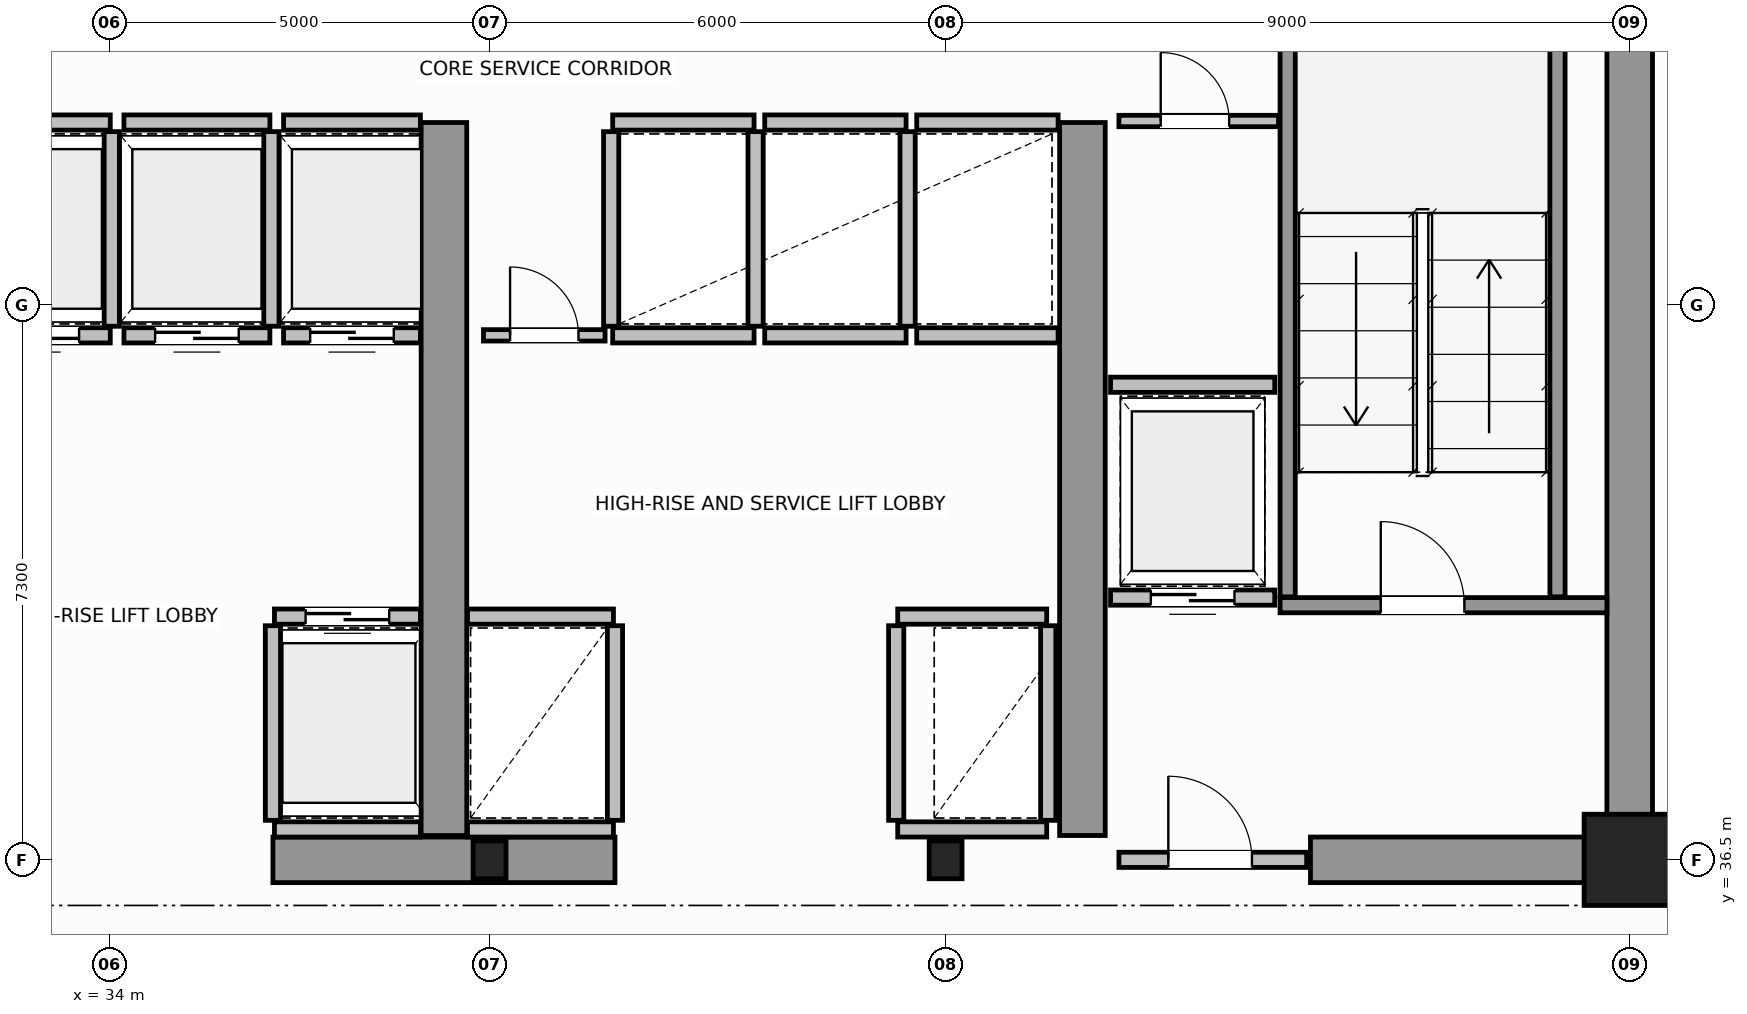
"""IFC4 building model, lengths in metres.
Left out: names, types, materials, properties, quantities, classifications, styles, units other than length and angle.
Written with IfcOpenShell. Run it as: python <this file> out.ifc"""

import sys

from ifc_helpers import new_model, si_unit, direction, frame, frame_2d, origin, origin_2d, place, context, subcontext, project, spatial, rectangle, i_section, extrude, source, transform, mapped, element, fill, save


model = new_model("IFC4")
c1 = context("Model", 3, precision=1e-05, world=origin(), true_north=direction((0.0, 1.0)))
c2 = subcontext(c1, "Body", "Model", "MODEL_VIEW")
j1 = project(units=[si_unit("LENGTHUNIT", "METRE"), si_unit("PLANEANGLEUNIT", "RADIAN")], contexts=[c1])
p1 = place(None, origin())
s1 = spatial("IfcSite", under=j1, at=p1, CompositionType="ELEMENT")
p2 = place(p1, origin())
s2 = spatial("IfcBuilding", under=s1, at=p2, CompositionType="ELEMENT")
p3 = place(p2, frame((0.0, 0.0, 191.8)))
s3 = spatial("IfcBuildingStorey", under=s2, at=p3, CompositionType="ELEMENT", Elevation=191.8)
m1 = source(origin(), c2, "Body", "SweptSolid", [
    extrude(i_section(OverallWidth=0.432, OverallDepth=0.498, WebThickness=0.055, FlangeThickness=0.068, FilletRadius=0.015, at=origin_2d()), origin(), (0.0, 0.0, 1.0), 3.8),
])
for number, where, z_axis, x_axis in (
    (1, (39.0, 36.5, 0.0), (0.0, 0.0, 1.0), (1.0, 0.0, 0.0)),
    (2, (45.0, 36.5, 0.0), (0.0, 0.0, 1.0), (1.0, 0.0, 0.0)),
):
    element("IfcColumn", number, at=place(p3, frame(where, z_axis=z_axis, x_axis=x_axis)), inside=s3, PredefinedType="COLUMN", context=c2, shape_type="MappedRepresentation", body=[
        mapped(m1, transform((0.0, 0.0, 0.0), scale=1.0)),
    ])
m2 = source(origin(), c2, "Body", "SweptSolid", [
    extrude(rectangle(XDim=1.2, YDim=1.2, at=origin_2d()), origin(), (0.0, 0.0, 1.0), 3.8),
])
p4 = place(p3, frame((54.0, 36.5, 0.0), z_axis=(0.0, 0.0, 1.0), x_axis=(1.0, 0.0, 0.0)))
e3 = element("IfcColumn", 3, at=p4, inside=s3, PredefinedType="COLUMN", context=c2, shape_type="MappedRepresentation", body=[
    mapped(m2, transform((0.0, 0.0, 0.0), scale=1.0)),
])
p5 = place(p3, frame((54.0, 36.5, 0.0), z_axis=(0.0, 0.0, 1.0), x_axis=(0.0, 1.0, 0.0)))
e4 = element("IfcWall", 4, at=p5, inside=s3, PredefinedType="SHEAR", context=c2, shape_type="SweptSolid", body=[
    extrude(rectangle(XDim=14.5, YDim=0.6, at=frame_2d((7.25, 0.0))), origin(), (0.0, 0.0, 1.0), 3.8),
])
p6 = place(p3, frame((36.15, 36.5, 0.0), z_axis=(0.0, 0.0, 1.0), x_axis=(1.0, 0.0, 0.0)))
e5 = element("IfcWall", 5, at=p6, inside=s3, PredefinedType="SHEAR", context=c2, shape_type="SweptSolid", body=[
    extrude(rectangle(XDim=4.5, YDim=0.6, at=frame_2d((2.25, 0.0))), origin(), (0.0, 0.0, 1.0), 3.8),
])
p7 = place(p3, frame((49.8, 36.5, 0.0), z_axis=(0.0, 0.0, 1.0), x_axis=(1.0, 0.0, 0.0)))
e6 = element("IfcWall", 6, at=p7, inside=s3, PredefinedType="SHEAR", context=c2, shape_type="SweptSolid", body=[
    extrude(rectangle(XDim=3.88, YDim=0.6, at=frame_2d((1.94, 0.0))), origin(), (0.0, 0.0, 1.0), 2.58),
])
for number, where, z_axis, x_axis in (
    (7, (38.4, 36.82, 0.0), (0.0, 0.0, 1.0), (0.0, 1.0, 0.0)),
    (8, (46.8, 36.82, 0.0), (0.0, 0.0, 1.0), (0.0, 1.0, 0.0)),
):
    element("IfcWall", number, at=place(p3, frame(where, z_axis=z_axis, x_axis=x_axis)), inside=s3, PredefinedType="SHEAR", context=c2, shape_type="SweptSolid", body=[
        extrude(rectangle(XDim=9.38, YDim=0.6, at=frame_2d((4.69, 0.0))), origin(), (0.0, 0.0, 1.0), 3.8),
    ])
p8 = place(p3, frame((49.4, 39.85, 0.0), z_axis=(0.0, 0.0, 1.0), x_axis=(1.0, 0.0, 0.0)))
e9 = element("IfcWall", 9, at=p8, inside=s3, PredefinedType="SOLIDWALL", context=c2, shape_type="SweptSolid", body=[
    extrude(rectangle(XDim=4.3, YDim=0.2, at=frame_2d((2.15, 0.0))), origin(), (0.0, 0.0, 1.0), 3.8),
])
p9 = place(p8, frame((1.325, 0.0, 0.0)))
e10 = element("IfcOpeningElement", 10, at=p9, cuts=e9, PredefinedType="OPENING", context=c2, shape_type="SweptSolid", body=[
    extrude(rectangle(XDim=1.1, YDim=2.15, at=frame_2d((0.55, 1.075))), frame((0.0, 0.11, 0.0), z_axis=(0.0, -1.0, 0.0), x_axis=(1.0, 0.0, 0.0)), (0.0, 0.0, 1.0), 0.22),
])
for number, where, z_axis, x_axis in (
    (11, (49.5, 39.96, 0.0), (0.0, 0.0, 1.0), (0.0, 1.0, 0.0)),
    (12, (53.05, 39.96, 0.0), (0.0, 0.0, 1.0), (0.0, 1.0, 0.0)),
):
    element("IfcWall", number, at=place(p3, frame(where, z_axis=z_axis, x_axis=x_axis)), inside=s3, PredefinedType="SOLIDWALL", context=c2, shape_type="SweptSolid", body=[
        extrude(rectangle(XDim=9.93, YDim=0.2, at=frame_2d((4.965, 0.0))), origin(), (0.0, 0.0, 1.0), 3.8),
    ])
p10 = place(p3, frame((47.28, 36.5, 0.0), z_axis=(0.0, 0.0, 1.0), x_axis=(1.0, 0.0, 0.0)))
e13 = element("IfcWall", 13, at=p10, inside=s3, PredefinedType="SOLIDWALL", context=c2, shape_type="SweptSolid", body=[
    extrude(rectangle(XDim=2.47, YDim=0.2, at=frame_2d((1.235, 0.0))), origin(), (0.0, 0.0, 1.0), 2.57),
])
p11 = place(p10, frame((0.65, 0.0, 0.0)))
e14 = element("IfcOpeningElement", 14, at=p11, cuts=e13, PredefinedType="OPENING", context=c2, shape_type="SweptSolid", body=[
    extrude(rectangle(XDim=1.1, YDim=2.15, at=frame_2d((0.55, 1.075))), frame((0.0, 0.11, 0.0), z_axis=(0.0, -1.0, 0.0), x_axis=(1.0, 0.0, 0.0)), (0.0, 0.0, 1.0), 0.22),
])
p12 = place(p3, frame((36.17, 39.7, 0.0), z_axis=(0.0, 0.0, 1.0), x_axis=(1.0, 0.0, 0.0)))
e15 = element("IfcWall", 15, at=p12, inside=s3, PredefinedType="SOLIDWALL", context=c2, shape_type="SweptSolid", body=[
    extrude(rectangle(XDim=1.92, YDim=0.2, at=frame_2d((0.96, 0.0))), origin(), (0.0, 0.0, 1.0), 3.58),
])
p13 = place(p12, frame((0.41, 0.0, 0.0)))
e16 = element("IfcOpeningElement", 16, at=p13, cuts=e15, PredefinedType="OPENING", context=c2, shape_type="SweptSolid", body=[
    extrude(rectangle(XDim=1.1, YDim=2.15, at=frame_2d((0.55, 1.075))), frame((0.0, 0.11, 0.0), z_axis=(0.0, -1.0, 0.0), x_axis=(1.0, 0.0, 0.0)), (0.0, 0.0, 1.0), 0.22),
])
p14 = place(p3, frame((36.17, 36.9, 0.0), z_axis=(0.0, 0.0, 1.0), x_axis=(1.0, 0.0, 0.0)))
e17 = element("IfcWall", 17, at=p14, inside=s3, PredefinedType="SOLIDWALL", context=c2, shape_type="SweptSolid", body=[
    extrude(rectangle(XDim=1.92, YDim=0.2, at=frame_2d((0.96, 0.0))), origin(), (0.0, 0.0, 1.0), 3.58),
])
p15 = place(p3, frame((36.15, 37.02, 0.0), z_axis=(0.0, 0.0, 1.0), x_axis=(0.0, 1.0, 0.0)))
e18 = element("IfcWall", 18, at=p15, inside=s3, PredefinedType="SOLIDWALL", context=c2, shape_type="SweptSolid", body=[
    extrude(rectangle(XDim=2.56, YDim=0.2, at=frame_2d((1.28, 0.0))), origin(), (0.0, 0.0, 1.0), 3.58),
])
p16 = place(p3, frame((32.09, 43.4, 0.0), z_axis=(0.0, 0.0, 1.0), x_axis=(1.0, 0.0, 0.0)))
e19 = element("IfcWall", 19, at=p16, inside=s3, PredefinedType="SOLIDWALL", context=c2, shape_type="SweptSolid", body=[
    extrude(rectangle(XDim=1.92, YDim=0.2, at=frame_2d((0.96, 0.0))), origin(), (0.0, 0.0, 1.0), 3.58),
])
p17 = place(p16, frame((0.41, 0.0, 0.0)))
e20 = element("IfcOpeningElement", 20, at=p17, cuts=e19, PredefinedType="OPENING", context=c2, shape_type="SweptSolid", body=[
    extrude(rectangle(XDim=1.1, YDim=2.15, at=frame_2d((0.55, 1.075))), frame((0.0, 0.11, 0.0), z_axis=(0.0, -1.0, 0.0), x_axis=(1.0, 0.0, 0.0)), (0.0, 0.0, 1.0), 0.22),
])
p18 = place(p3, frame((32.09, 46.2, 0.0), z_axis=(0.0, 0.0, 1.0), x_axis=(1.0, 0.0, 0.0)))
e21 = element("IfcWall", 21, at=p18, inside=s3, PredefinedType="SOLIDWALL", context=c2, shape_type="SweptSolid", body=[
    extrude(rectangle(XDim=1.92, YDim=0.2, at=frame_2d((0.96, 0.0))), origin(), (0.0, 0.0, 1.0), 3.58),
])
p19 = place(p3, frame((34.03, 43.52, 0.0), z_axis=(0.0, 0.0, 1.0), x_axis=(0.0, 1.0, 0.0)))
e22 = element("IfcWall", 22, at=p19, inside=s3, PredefinedType="SOLIDWALL", context=c2, shape_type="SweptSolid", body=[
    extrude(rectangle(XDim=2.56, YDim=0.2, at=frame_2d((1.28, 0.0))), origin(), (0.0, 0.0, 1.0), 3.58),
])
p20 = place(p3, frame((34.19, 43.4, 0.0), z_axis=(0.0, 0.0, 1.0), x_axis=(1.0, 0.0, 0.0)))
e23 = element("IfcWall", 23, at=p20, inside=s3, PredefinedType="SOLIDWALL", context=c2, shape_type="SweptSolid", body=[
    extrude(rectangle(XDim=1.92, YDim=0.2, at=frame_2d((0.96, 0.0))), origin(), (0.0, 0.0, 1.0), 3.58),
])
p21 = place(p20, frame((0.41, 0.0, 0.0)))
e24 = element("IfcOpeningElement", 24, at=p21, cuts=e23, PredefinedType="OPENING", context=c2, shape_type="SweptSolid", body=[
    extrude(rectangle(XDim=1.1, YDim=2.15, at=frame_2d((0.55, 1.075))), frame((0.0, 0.11, 0.0), z_axis=(0.0, -1.0, 0.0), x_axis=(1.0, 0.0, 0.0)), (0.0, 0.0, 1.0), 0.22),
])
p22 = place(p3, frame((34.19, 46.2, 0.0), z_axis=(0.0, 0.0, 1.0), x_axis=(1.0, 0.0, 0.0)))
e25 = element("IfcWall", 25, at=p22, inside=s3, PredefinedType="SOLIDWALL", context=c2, shape_type="SweptSolid", body=[
    extrude(rectangle(XDim=1.92, YDim=0.2, at=frame_2d((0.96, 0.0))), origin(), (0.0, 0.0, 1.0), 3.58),
])
p23 = place(p3, frame((36.13, 43.52, 0.0), z_axis=(0.0, 0.0, 1.0), x_axis=(0.0, 1.0, 0.0)))
e26 = element("IfcWall", 26, at=p23, inside=s3, PredefinedType="SOLIDWALL", context=c2, shape_type="SweptSolid", body=[
    extrude(rectangle(XDim=2.56, YDim=0.2, at=frame_2d((1.28, 0.0))), origin(), (0.0, 0.0, 1.0), 3.58),
])
p24 = place(p3, frame((36.29, 43.4, 0.0), z_axis=(0.0, 0.0, 1.0), x_axis=(1.0, 0.0, 0.0)))
e27 = element("IfcWall", 27, at=p24, inside=s3, PredefinedType="SOLIDWALL", context=c2, shape_type="SweptSolid", body=[
    extrude(rectangle(XDim=1.8, YDim=0.2, at=frame_2d((0.9, 0.0))), origin(), (0.0, 0.0, 1.0), 3.58),
])
p25 = place(p24, frame((0.35, 0.0, 0.0)))
e28 = element("IfcOpeningElement", 28, at=p25, cuts=e27, PredefinedType="OPENING", context=c2, shape_type="SweptSolid", body=[
    extrude(rectangle(XDim=1.1, YDim=2.15, at=frame_2d((0.55, 1.075))), frame((0.0, 0.11, 0.0), z_axis=(0.0, -1.0, 0.0), x_axis=(1.0, 0.0, 0.0)), (0.0, 0.0, 1.0), 0.22),
])
p26 = place(p3, frame((36.29, 46.2, 0.0), z_axis=(0.0, 0.0, 1.0), x_axis=(1.0, 0.0, 0.0)))
e29 = element("IfcWall", 29, at=p26, inside=s3, PredefinedType="SOLIDWALL", context=c2, shape_type="SweptSolid", body=[
    extrude(rectangle(XDim=1.8, YDim=0.2, at=frame_2d((0.9, 0.0))), origin(), (0.0, 0.0, 1.0), 3.58),
])
for number, where, z_axis, x_axis in (
    (30, (38.71, 39.7, 0.0), (0.0, 0.0, 1.0), (1.0, 0.0, 0.0)),
    (31, (38.71, 36.9, 0.0), (0.0, 0.0, 1.0), (1.0, 0.0, 0.0)),
):
    element("IfcWall", number, at=place(p3, frame(where, z_axis=z_axis, x_axis=x_axis)), inside=s3, PredefinedType="SOLIDWALL", context=c2, shape_type="SweptSolid", body=[
        extrude(rectangle(XDim=1.92, YDim=0.2, at=frame_2d((0.96, 0.0))), origin(), (0.0, 0.0, 1.0), 3.58),
    ])
p27 = place(p3, frame((40.65, 37.02, 0.0), z_axis=(0.0, 0.0, 1.0), x_axis=(0.0, 1.0, 0.0)))
e32 = element("IfcWall", 32, at=p27, inside=s3, PredefinedType="SOLIDWALL", context=c2, shape_type="SweptSolid", body=[
    extrude(rectangle(XDim=2.56, YDim=0.2, at=frame_2d((1.28, 0.0))), origin(), (0.0, 0.0, 1.0), 3.58),
])
p28 = place(p3, frame((44.37, 39.7, 0.0), z_axis=(0.0, 0.0, 1.0), x_axis=(1.0, 0.0, 0.0)))
e33 = element("IfcWall", 33, at=p28, inside=s3, PredefinedType="SOLIDWALL", context=c2, shape_type="SweptSolid", body=[
    extrude(rectangle(XDim=1.96, YDim=0.2, at=frame_2d((0.98, 0.0))), origin(), (0.0, 0.0, 1.0), 3.58),
])
p29 = place(p3, frame((44.37, 36.9, 0.0), z_axis=(0.0, 0.0, 1.0), x_axis=(1.0, 0.0, 0.0)))
e34 = element("IfcWall", 34, at=p29, inside=s3, PredefinedType="SOLIDWALL", context=c2, shape_type="SweptSolid", body=[
    extrude(rectangle(XDim=1.96, YDim=0.2, at=frame_2d((0.98, 0.0))), origin(), (0.0, 0.0, 1.0), 2.57),
])
for number, where, z_axis, x_axis in (
    (35, (44.35, 37.02, 0.0), (0.0, 0.0, 1.0), (0.0, 1.0, 0.0)),
    (36, (46.35, 37.02, 0.0), (0.0, 0.0, 1.0), (0.0, 1.0, 0.0)),
):
    element("IfcWall", number, at=place(p3, frame(where, z_axis=z_axis, x_axis=x_axis)), inside=s3, PredefinedType="SOLIDWALL", context=c2, shape_type="SweptSolid", body=[
        extrude(rectangle(XDim=2.56, YDim=0.2, at=frame_2d((1.28, 0.0))), origin(), (0.0, 0.0, 1.0), 3.58),
    ])
for number, where, z_axis, x_axis in (
    (37, (40.62, 43.4, 0.0), (0.0, 0.0, 1.0), (1.0, 0.0, 0.0)),
    (38, (40.62, 46.2, 0.0), (0.0, 0.0, 1.0), (1.0, 0.0, 0.0)),
):
    element("IfcWall", number, at=place(p3, frame(where, z_axis=z_axis, x_axis=x_axis)), inside=s3, PredefinedType="SOLIDWALL", context=c2, shape_type="SweptSolid", body=[
        extrude(rectangle(XDim=1.86, YDim=0.2, at=frame_2d((0.93, 0.0))), origin(), (0.0, 0.0, 1.0), 3.58),
    ])
for number, where, z_axis, x_axis in (
    (39, (40.6, 43.52, 0.0), (0.0, 0.0, 1.0), (0.0, 1.0, 0.0)),
    (40, (42.5, 43.52, 0.0), (0.0, 0.0, 1.0), (0.0, 1.0, 0.0)),
):
    element("IfcWall", number, at=place(p3, frame(where, z_axis=z_axis, x_axis=x_axis)), inside=s3, PredefinedType="SOLIDWALL", context=c2, shape_type="SweptSolid", body=[
        extrude(rectangle(XDim=2.56, YDim=0.2, at=frame_2d((1.28, 0.0))), origin(), (0.0, 0.0, 1.0), 3.58),
    ])
for number, where, z_axis, x_axis in (
    (41, (42.62, 43.4, 0.0), (0.0, 0.0, 1.0), (1.0, 0.0, 0.0)),
    (42, (42.62, 46.2, 0.0), (0.0, 0.0, 1.0), (1.0, 0.0, 0.0)),
):
    element("IfcWall", number, at=place(p3, frame(where, z_axis=z_axis, x_axis=x_axis)), inside=s3, PredefinedType="SOLIDWALL", context=c2, shape_type="SweptSolid", body=[
        extrude(rectangle(XDim=1.86, YDim=0.2, at=frame_2d((0.93, 0.0))), origin(), (0.0, 0.0, 1.0), 3.58),
    ])
p30 = place(p3, frame((44.5, 43.52, 0.0), z_axis=(0.0, 0.0, 1.0), x_axis=(0.0, 1.0, 0.0)))
e43 = element("IfcWall", 43, at=p30, inside=s3, PredefinedType="SOLIDWALL", context=c2, shape_type="SweptSolid", body=[
    extrude(rectangle(XDim=2.56, YDim=0.2, at=frame_2d((1.28, 0.0))), origin(), (0.0, 0.0, 1.0), 3.58),
])
for number, where, z_axis, x_axis in (
    (44, (44.62, 43.4, 0.0), (0.0, 0.0, 1.0), (1.0, 0.0, 0.0)),
    (45, (44.62, 46.2, 0.0), (0.0, 0.0, 1.0), (1.0, 0.0, 0.0)),
):
    element("IfcWall", number, at=place(p3, frame(where, z_axis=z_axis, x_axis=x_axis)), inside=s3, PredefinedType="SOLIDWALL", context=c2, shape_type="SweptSolid", body=[
        extrude(rectangle(XDim=1.86, YDim=0.2, at=frame_2d((0.93, 0.0))), origin(), (0.0, 0.0, 1.0), 3.58),
    ])
p31 = place(p3, frame((47.17, 39.95, 0.0), z_axis=(0.0, 0.0, 1.0), x_axis=(1.0, 0.0, 0.0)))
e46 = element("IfcWall", 46, at=p31, inside=s3, PredefinedType="SOLIDWALL", context=c2, shape_type="SweptSolid", body=[
    extrude(rectangle(XDim=2.16, YDim=0.2, at=frame_2d((1.08, 0.0))), origin(), (0.0, 0.0, 1.0), 3.58),
])
p32 = place(p31, frame((0.53, 0.0, 0.0)))
e47 = element("IfcOpeningElement", 47, at=p32, cuts=e46, PredefinedType="OPENING", context=c2, shape_type="SweptSolid", body=[
    extrude(rectangle(XDim=1.1, YDim=2.15, at=frame_2d((0.55, 1.075))), frame((0.0, 0.11, 0.0), z_axis=(0.0, -1.0, 0.0), x_axis=(1.0, 0.0, 0.0)), (0.0, 0.0, 1.0), 0.22),
])
p33 = place(p3, frame((47.17, 42.75, 0.0), z_axis=(0.0, 0.0, 1.0), x_axis=(1.0, 0.0, 0.0)))
e48 = element("IfcWall", 48, at=p33, inside=s3, PredefinedType="SOLIDWALL", context=c2, shape_type="SweptSolid", body=[
    extrude(rectangle(XDim=2.16, YDim=0.2, at=frame_2d((1.08, 0.0))), origin(), (0.0, 0.0, 1.0), 3.58),
])
p34 = place(p3, frame((47.28, 46.22, 0.0), z_axis=(0.0, 0.0, 1.0), x_axis=(1.0, 0.0, 0.0)))
e49 = element("IfcWall", 49, at=p34, inside=s3, PredefinedType="PARTITIONING", context=c2, shape_type="SweptSolid", body=[
    extrude(rectangle(XDim=2.1, YDim=0.15, at=frame_2d((1.05, 0.0))), origin(), (0.0, 0.0, 1.0), 3.58),
])
p35 = place(p34, frame((0.55, 0.0, 0.0)))
e50 = element("IfcOpeningElement", 50, at=p35, cuts=e49, PredefinedType="OPENING", context=c2, shape_type="SweptSolid", body=[
    extrude(rectangle(XDim=0.9, YDim=2.1, at=frame_2d((0.45, 1.05))), frame((0.0, 0.085, 0.0), z_axis=(0.0, -1.0, 0.0), x_axis=(1.0, 0.0, 0.0)), (0.0, 0.0, 1.0), 0.17),
])
p36 = place(p3, frame((38.92, 43.4, 0.0), z_axis=(0.0, 0.0, 1.0), x_axis=(1.0, 0.0, 0.0)))
e51 = element("IfcWall", 51, at=p36, inside=s3, PredefinedType="PARTITIONING", context=c2, shape_type="SweptSolid", body=[
    extrude(rectangle(XDim=1.6, YDim=0.15, at=frame_2d((0.8, 0.0))), origin(), (0.0, 0.0, 1.0), 3.58),
])
p37 = place(p36, frame((0.35, 0.0, 0.0)))
e52 = element("IfcOpeningElement", 52, at=p37, cuts=e51, PredefinedType="OPENING", context=c2, shape_type="SweptSolid", body=[
    extrude(rectangle(XDim=0.9, YDim=2.1, at=frame_2d((0.45, 1.05))), frame((0.0, 0.085, 0.0), z_axis=(0.0, -1.0, 0.0), x_axis=(1.0, 0.0, 0.0)), (0.0, 0.0, 1.0), 0.17),
])
p38 = place(p3, frame((54.06, 36.48, 0.0), z_axis=(0.0, 0.0, 1.0), x_axis=(1.0, 0.0, 0.0)))
e53 = element("IfcWall", 53, at=p38, inside=s3, PredefinedType="PARTITIONING", context=c2, shape_type="SweptSolid", body=[
    extrude(rectangle(XDim=6.651, YDim=0.12, at=frame_2d((3.325, 0.0))), origin(), (0.0, 0.0, 1.0), 2.97),
])
p39 = place(p38, frame((2.875, 0.0, 0.0)))
e54 = element("IfcOpeningElement", 54, at=p39, cuts=e53, PredefinedType="OPENING", context=c2, shape_type="SweptSolid", body=[
    extrude(rectangle(XDim=0.9, YDim=2.15, at=frame_2d((0.45, 1.075))), frame((0.0, 0.07, 0.0), z_axis=(0.0, -1.0, 0.0), x_axis=(1.0, 0.0, 0.0)), (0.0, 0.0, 1.0), 0.14),
])
m3 = source(origin(), c2, "Body", "SweptSolid", [
    extrude(rectangle(XDim=1.1, YDim=2.15, at=frame_2d((0.55, 1.075))), frame((0.0, 0.025, 0.0), z_axis=(0.0, -1.0, 0.0), x_axis=(1.0, 0.0, 0.0)), (0.0, 0.0, 1.0), 0.05),
])
p40 = place(p9, origin())
e55 = element("IfcDoor", 55, at=p40, inside=s3, OperationType="SINGLE_SWING_RIGHT", PredefinedType="DOOR", context=c2, shape_type="MappedRepresentation", body=[
    mapped(m3, transform((0.0, 0.0, 0.0), scale=1.0)),
])
fill(e10, e55)
p41 = place(p11, origin())
e56 = element("IfcDoor", 56, at=p41, inside=s3, OperationType="SINGLE_SWING_LEFT", PredefinedType="DOOR", context=c2, shape_type="MappedRepresentation", body=[
    mapped(m3, transform((0.0, 0.0, 0.0), scale=1.0)),
])
fill(e14, e56)
p42 = place(p13, origin())
e57 = element("IfcDoor", 57, at=p42, inside=s3, OperationType="DOUBLE_DOOR_SLIDING", PredefinedType="DOOR", context=c2, shape_type="MappedRepresentation", body=[
    mapped(m3, transform((0.0, 0.0, 0.0), scale=1.0)),
])
fill(e16, e57)
p43 = place(p17, origin())
e58 = element("IfcDoor", 58, at=p43, inside=s3, OperationType="DOUBLE_DOOR_SLIDING", PredefinedType="DOOR", context=c2, shape_type="MappedRepresentation", body=[
    mapped(m3, transform((0.0, 0.0, 0.0), scale=1.0)),
])
fill(e20, e58)
p44 = place(p21, origin())
e59 = element("IfcDoor", 59, at=p44, inside=s3, OperationType="DOUBLE_DOOR_SLIDING", PredefinedType="DOOR", context=c2, shape_type="MappedRepresentation", body=[
    mapped(m3, transform((0.0, 0.0, 0.0), scale=1.0)),
])
fill(e24, e59)
p45 = place(p25, origin())
e60 = element("IfcDoor", 60, at=p45, inside=s3, OperationType="DOUBLE_DOOR_SLIDING", PredefinedType="DOOR", context=c2, shape_type="MappedRepresentation", body=[
    mapped(m3, transform((0.0, 0.0, 0.0), scale=1.0)),
])
fill(e28, e60)
p46 = place(p32, origin())
e61 = element("IfcDoor", 61, at=p46, inside=s3, OperationType="DOUBLE_DOOR_SLIDING", PredefinedType="DOOR", context=c2, shape_type="MappedRepresentation", body=[
    mapped(m3, transform((0.0, 0.0, 0.0), scale=1.0)),
])
fill(e47, e61)
m4 = source(origin(), c2, "Body", "SweptSolid", [
    extrude(rectangle(XDim=0.9, YDim=2.1, at=frame_2d((0.45, 1.05))), frame((0.0, 0.025, 0.0), z_axis=(0.0, -1.0, 0.0), x_axis=(1.0, 0.0, 0.0)), (0.0, 0.0, 1.0), 0.05),
])
p47 = place(p35, origin())
e62 = element("IfcDoor", 62, at=p47, inside=s3, OperationType="SINGLE_SWING_RIGHT", PredefinedType="DOOR", context=c2, shape_type="MappedRepresentation", body=[
    mapped(m4, transform((0.0, 0.0, 0.0), scale=1.0)),
])
fill(e50, e62)
p48 = place(p37, origin())
e63 = element("IfcDoor", 63, at=p48, inside=s3, OperationType="SINGLE_SWING_LEFT", PredefinedType="DOOR", context=c2, shape_type="MappedRepresentation", body=[
    mapped(m4, transform((0.0, 0.0, 0.0), scale=1.0)),
])
fill(e52, e63)
save(model, sys.argv[1])
